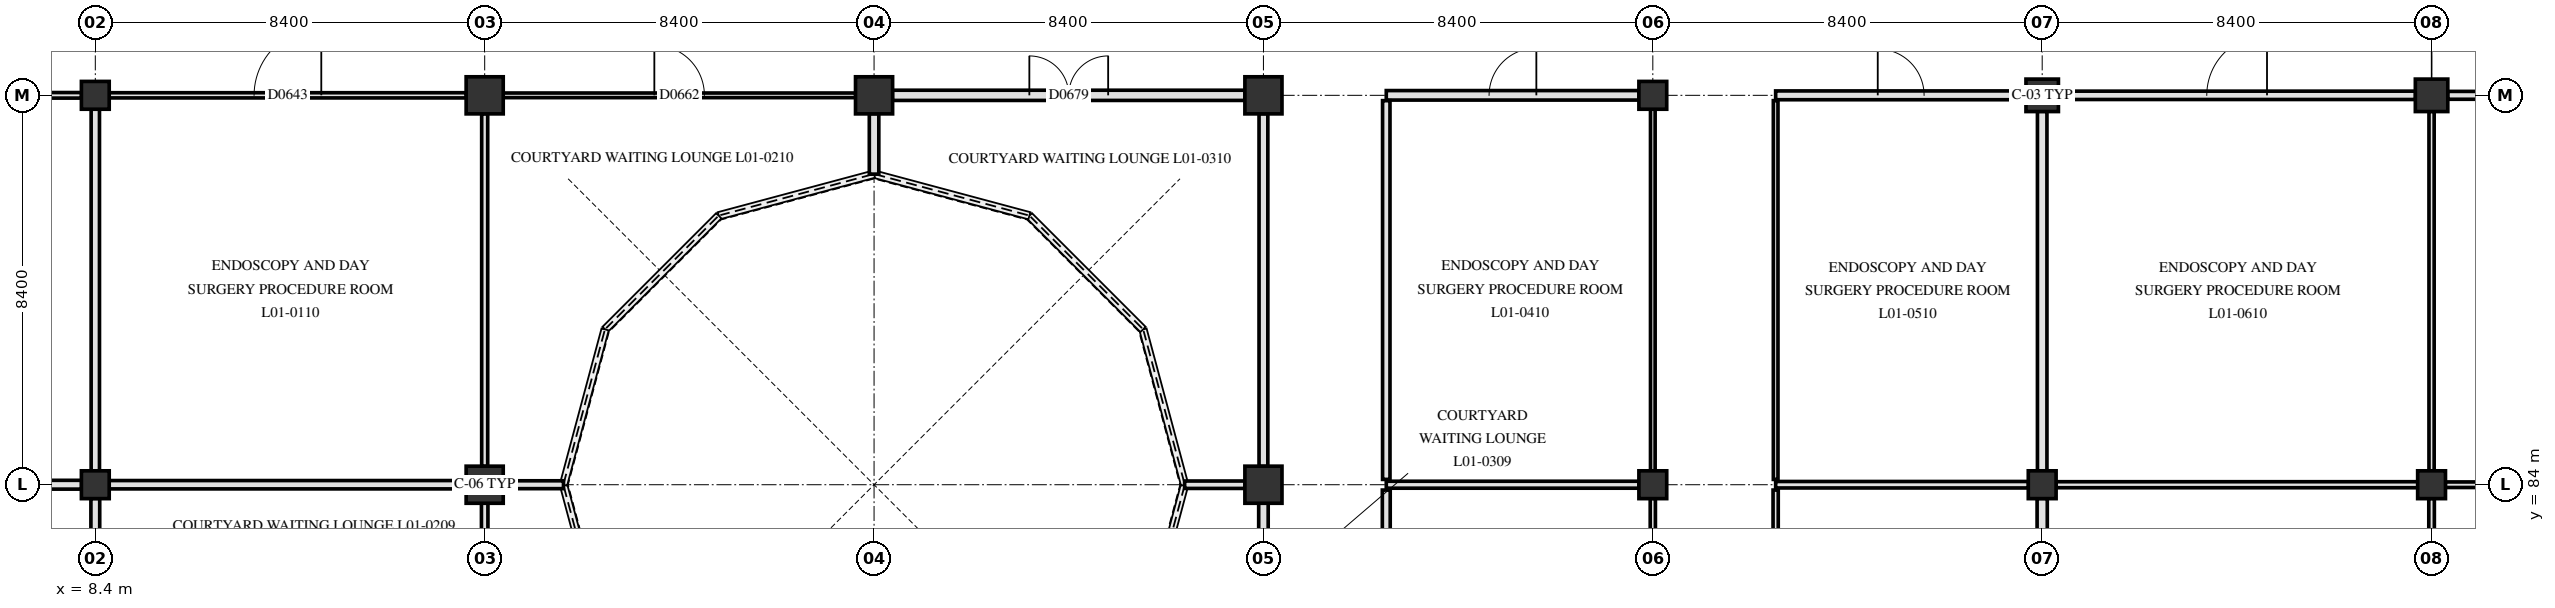
"""IFC4 building model, lengths in metres.
Left out: names, types, materials, properties, quantities, classifications, styles, units other than length and angle.
Written with IfcOpenShell. Run it as: python <this file> out.ifc"""

import sys

from ifc_helpers import new_model, si_unit, direction, frame, frame_2d, origin, origin_2d, place, context, subcontext, project, spatial, rectangle, circle, extrude, element, fill, save


model = new_model("IFC4")
c1 = context("Model", 3, precision=1e-05, world=origin(), true_north=direction((0.0, 1.0)))
c2 = subcontext(c1, "Body", "Model", "MODEL_VIEW")
j1 = project(units=[si_unit("LENGTHUNIT", "METRE"), si_unit("PLANEANGLEUNIT", "RADIAN")], contexts=[c1])
p1 = place(None, origin())
s1 = spatial("IfcSite", under=j1, at=p1, CompositionType="ELEMENT")
p2 = place(p1, origin())
s2 = spatial("IfcBuilding", under=s1, at=p2, CompositionType="ELEMENT")
p3 = place(p2, frame((0.0, 0.0, 4.8)))
s3 = spatial("IfcBuildingStorey", under=s2, at=p3, CompositionType="ELEMENT", Elevation=4.8)
for number, where, z_axis, x_axis in (
    (1, (8.4, 84.0, 0.0), (0.0, 0.0, 1.0), (1.0, 0.0, 0.0)),
    (2, (8.4, 92.4, 0.0), (0.0, 0.0, 1.0), (1.0, 0.0, 0.0)),
):
    element("IfcColumn", number, at=place(p3, frame(where, z_axis=z_axis, x_axis=x_axis)), inside=s3, PredefinedType="COLUMN", context=c2, shape_type="SweptSolid", body=[
        extrude(rectangle(XDim=0.6, YDim=0.6, at=origin_2d()), origin(), (0.0, 0.0, 1.0), 4.5),
    ])
for number, where, z_axis, x_axis in (
    (3, (16.8, 84.0, 0.0), (0.0, 0.0, 1.0), (1.0, 0.0, 0.0)),
    (4, (16.8, 92.4, 0.0), (0.0, 0.0, 1.0), (1.0, 0.0, 0.0)),
    (5, (25.2, 92.4, 0.0), (0.0, 0.0, 1.0), (1.0, 0.0, 0.0)),
    (6, (33.6, 84.0, 0.0), (0.0, 0.0, 1.0), (1.0, 0.0, 0.0)),
    (7, (33.6, 92.4, 0.0), (0.0, 0.0, 1.0), (1.0, 0.0, 0.0)),
):
    element("IfcColumn", number, at=place(p3, frame(where, z_axis=z_axis, x_axis=x_axis)), inside=s3, PredefinedType="COLUMN", context=c2, shape_type="SweptSolid", body=[
        extrude(circle(Radius=0.4, at=origin_2d()), origin(), (0.0, 0.0, 1.0), 4.5),
    ])
for number, where, z_axis, x_axis in (
    (8, (42.0, 84.0, 0.0), (0.0, 0.0, 1.0), (1.0, 0.0, 0.0)),
    (9, (42.0, 92.4, 0.0), (0.0, 0.0, 1.0), (1.0, 0.0, 0.0)),
    (10, (50.4, 84.0, 0.0), (0.0, 0.0, 1.0), (1.0, 0.0, 0.0)),
):
    element("IfcColumn", number, at=place(p3, frame(where, z_axis=z_axis, x_axis=x_axis)), inside=s3, PredefinedType="COLUMN", context=c2, shape_type="SweptSolid", body=[
        extrude(rectangle(XDim=0.6, YDim=0.6, at=origin_2d()), origin(), (0.0, 0.0, 1.0), 4.5),
    ])
p4 = place(p3, frame((50.4, 92.4, 0.0), z_axis=(0.0, 0.0, 1.0), x_axis=(1.0, 0.0, 0.0)))
e11 = element("IfcColumn", 11, at=p4, inside=s3, PredefinedType="COLUMN", context=c2, shape_type="SweptSolid", body=[
    extrude(rectangle(XDim=0.7, YDim=0.7, at=origin_2d()), origin(), (0.0, 0.0, 1.0), 4.5),
])
p5 = place(p3, frame((58.8, 84.0, 0.0), z_axis=(0.0, 0.0, 1.0), x_axis=(1.0, 0.0, 0.0)))
e12 = element("IfcColumn", 12, at=p5, inside=s3, PredefinedType="COLUMN", context=c2, shape_type="SweptSolid", body=[
    extrude(rectangle(XDim=0.6, YDim=0.6, at=origin_2d()), origin(), (0.0, 0.0, 1.0), 4.5),
])
p6 = place(p3, frame((58.8, 92.4, 0.0), z_axis=(0.0, 0.0, 1.0), x_axis=(1.0, 0.0, 0.0)))
e13 = element("IfcColumn", 13, at=p6, inside=s3, PredefinedType="COLUMN", context=c2, shape_type="SweptSolid", body=[
    extrude(rectangle(XDim=0.7, YDim=0.7, at=origin_2d()), origin(), (0.0, 0.0, 1.0), 4.5),
])
p7 = place(p3, frame((0.295, 84.0, 0.0), z_axis=(0.0, 0.0, 1.0), x_axis=(1.0, 0.0, 0.0)))
e14 = element("IfcWall", 14, at=p7, inside=s3, PredefinedType="PARTITIONING", context=c2, shape_type="SweptSolid", body=[
    extrude(rectangle(XDim=7.81, YDim=0.19, at=frame_2d((3.905, 0.0))), origin(), (0.0, 0.0, 1.0), 3.54),
])
p8 = place(p3, frame((8.695, 84.0, 0.0), z_axis=(0.0, 0.0, 1.0), x_axis=(1.0, 0.0, 0.0)))
e15 = element("IfcWall", 15, at=p8, inside=s3, PredefinedType="PARTITIONING", context=c2, shape_type="SweptSolid", body=[
    extrude(rectangle(XDim=7.71, YDim=0.18, at=frame_2d((3.855, 0.0))), origin(), (0.0, 0.0, 1.0), 3.54),
])
p9 = place(p3, frame((17.195, 84.0, 0.0), z_axis=(0.0, 0.0, 1.0), x_axis=(1.0, 0.0, 0.0)))
e16 = element("IfcWall", 16, at=p9, inside=s3, PredefinedType="PARTITIONING", context=c2, shape_type="SweptSolid", body=[
    extrude(rectangle(XDim=1.305, YDim=0.17, at=frame_2d((0.652, 0.0))), origin(), (0.0, 0.0, 1.0), 4.14),
])
p10 = place(p3, frame((31.9, 84.0, 0.0), z_axis=(0.0, 0.0, 1.0), x_axis=(1.0, 0.0, 0.0)))
e17 = element("IfcWall", 17, at=p10, inside=s3, PredefinedType="PARTITIONING", context=c2, shape_type="SweptSolid", body=[
    extrude(rectangle(XDim=1.305, YDim=0.16, at=frame_2d((0.653, 0.0))), origin(), (0.0, 0.0, 1.0), 4.14),
])
p11 = place(p3, frame((36.25, 84.0, 0.0), z_axis=(0.0, 0.0, 1.0), x_axis=(1.0, 0.0, 0.0)))
e18 = element("IfcWall", 18, at=p11, inside=s3, PredefinedType="PARTITIONING", context=c2, shape_type="SweptSolid", body=[
    extrude(rectangle(XDim=5.455, YDim=0.15, at=frame_2d((2.728, 0.0))), origin(), (0.0, 0.0, 1.0), 3.54),
])
p12 = place(p3, frame((44.65, 84.0, 0.0), z_axis=(0.0, 0.0, 1.0), x_axis=(1.0, 0.0, 0.0)))
e19 = element("IfcWall", 19, at=p12, inside=s3, PredefinedType="PARTITIONING", context=c2, shape_type="SweptSolid", body=[
    extrude(rectangle(XDim=5.455, YDim=0.14, at=frame_2d((2.728, 0.0))), origin(), (0.0, 0.0, 1.0), 3.54),
])
p13 = place(p3, frame((50.695, 84.0, 0.0), z_axis=(0.0, 0.0, 1.0), x_axis=(1.0, 0.0, 0.0)))
e20 = element("IfcWall", 20, at=p13, inside=s3, PredefinedType="PARTITIONING", context=c2, shape_type="SweptSolid", body=[
    extrude(rectangle(XDim=7.81, YDim=0.13, at=frame_2d((3.905, 0.0))), origin(), (0.0, 0.0, 1.0), 3.54),
])
p14 = place(p3, frame((59.095, 84.0, 0.0), z_axis=(0.0, 0.0, 1.0), x_axis=(1.0, 0.0, 0.0)))
e21 = element("IfcWall", 21, at=p14, inside=s3, PredefinedType="PARTITIONING", context=c2, shape_type="SweptSolid", body=[
    extrude(rectangle(XDim=7.81, YDim=0.12, at=frame_2d((3.905, 0.0))), origin(), (0.0, 0.0, 1.0), 3.54),
])
p15 = place(p3, frame((0.295, 92.4, 0.0), z_axis=(0.0, 0.0, 1.0), x_axis=(1.0, 0.0, 0.0)))
e22 = element("IfcWall", 22, at=p15, inside=s3, PredefinedType="PARTITIONING", context=c2, shape_type="SweptSolid", body=[
    extrude(rectangle(XDim=7.81, YDim=0.12, at=frame_2d((3.905, 0.0))), origin(), (0.0, 0.0, 1.0), 3.54),
])
p16 = place(p15, frame((3.28, 0.0, 0.0)))
e23 = element("IfcOpeningElement", 23, at=p16, cuts=e22, PredefinedType="OPENING", context=c2, shape_type="SweptSolid", body=[
    extrude(rectangle(XDim=1.25, YDim=2.2, at=frame_2d((0.625, 1.1))), frame((0.0, 0.07, 0.0), z_axis=(0.0, -1.0, 0.0), x_axis=(1.0, 0.0, 0.0)), (0.0, 0.0, 1.0), 0.14),
])
p17 = place(p3, frame((8.695, 92.4, 0.0), z_axis=(0.0, 0.0, 1.0), x_axis=(1.0, 0.0, 0.0)))
e24 = element("IfcWall", 24, at=p17, inside=s3, PredefinedType="PARTITIONING", context=c2, shape_type="SweptSolid", body=[
    extrude(rectangle(XDim=7.71, YDim=0.112, at=frame_2d((3.855, 0.0))), origin(), (0.0, 0.0, 1.0), 3.54),
])
p18 = place(p17, frame((3.13, 0.0, 0.0)))
e25 = element("IfcOpeningElement", 25, at=p18, cuts=e24, PredefinedType="OPENING", context=c2, shape_type="SweptSolid", body=[
    extrude(rectangle(XDim=1.45, YDim=2.2, at=frame_2d((0.725, 1.1))), frame((0.0, 0.066, 0.0), z_axis=(0.0, -1.0, 0.0), x_axis=(1.0, 0.0, 0.0)), (0.0, 0.0, 1.0), 0.132),
])
p19 = place(p3, frame((17.195, 92.4, 0.0), z_axis=(0.0, 0.0, 1.0), x_axis=(1.0, 0.0, 0.0)))
e26 = element("IfcWall", 26, at=p19, inside=s3, PredefinedType="PARTITIONING", context=c2, shape_type="SweptSolid", body=[
    extrude(rectangle(XDim=7.61, YDim=0.1, at=frame_2d((3.805, 0.0))), origin(), (0.0, 0.0, 1.0), 3.54),
])
p20 = place(p19, frame((3.265, 0.0, 0.0)))
e27 = element("IfcOpeningElement", 27, at=p20, cuts=e26, PredefinedType="OPENING", context=c2, shape_type="SweptSolid", body=[
    extrude(rectangle(XDim=1.08, YDim=2.12, at=frame_2d((0.54, 1.06))), frame((0.0, 0.06, 0.0), z_axis=(0.0, -1.0, 0.0), x_axis=(1.0, 0.0, 0.0)), (0.0, 0.0, 1.0), 0.12),
])
p21 = place(p3, frame((25.595, 92.4, 0.0), z_axis=(0.0, 0.0, 1.0), x_axis=(1.0, 0.0, 0.0)))
e28 = element("IfcWall", 28, at=p21, inside=s3, PredefinedType="PARTITIONING", context=c2, shape_type="SweptSolid", body=[
    extrude(rectangle(XDim=7.61, YDim=0.22, at=frame_2d((3.805, 0.0))), origin(), (0.0, 0.0, 1.0), 3.54),
])
p22 = place(p21, frame((2.955, 0.0, 0.0)))
e29 = element("IfcOpeningElement", 29, at=p22, cuts=e28, PredefinedType="OPENING", context=c2, shape_type="SweptSolid", body=[
    extrude(rectangle(XDim=1.7, YDim=2.25, at=frame_2d((0.85, 1.125))), frame((0.0, 0.12, 0.0), z_axis=(0.0, -1.0, 0.0), x_axis=(1.0, 0.0, 0.0)), (0.0, 0.0, 1.0), 0.24),
])
p23 = place(p3, frame((36.25, 92.4, 0.0), z_axis=(0.0, 0.0, 1.0), x_axis=(1.0, 0.0, 0.0)))
e30 = element("IfcWall", 30, at=p23, inside=s3, PredefinedType="PARTITIONING", context=c2, shape_type="SweptSolid", body=[
    extrude(rectangle(XDim=5.455, YDim=0.205, at=frame_2d((2.728, 0.0))), origin(), (0.0, 0.0, 1.0), 3.54),
])
p24 = place(p23, frame((2.218, 0.0, 0.0)))
e31 = element("IfcOpeningElement", 31, at=p24, cuts=e30, PredefinedType="OPENING", context=c2, shape_type="SweptSolid", body=[
    extrude(rectangle(XDim=1.02, YDim=2.12, at=frame_2d((0.51, 1.06))), frame((0.0, 0.113, 0.0), z_axis=(0.0, -1.0, 0.0), x_axis=(1.0, 0.0, 0.0)), (0.0, 0.0, 1.0), 0.225),
])
p25 = place(p3, frame((44.65, 92.4, 0.0), z_axis=(0.0, 0.0, 1.0), x_axis=(1.0, 0.0, 0.0)))
e32 = element("IfcWall", 32, at=p25, inside=s3, PredefinedType="PARTITIONING", context=c2, shape_type="SweptSolid", body=[
    extrude(rectangle(XDim=5.405, YDim=0.19, at=frame_2d((2.703, 0.0))), origin(), (0.0, 0.0, 1.0), 3.54),
])
p26 = place(p25, frame((2.202, 0.0, 0.0)))
e33 = element("IfcOpeningElement", 33, at=p26, cuts=e32, PredefinedType="OPENING", context=c2, shape_type="SweptSolid", body=[
    extrude(rectangle(XDim=1.0, YDim=2.15, at=frame_2d((0.5, 1.075))), frame((0.0, 0.105, 0.0), z_axis=(0.0, -1.0, 0.0), x_axis=(1.0, 0.0, 0.0)), (0.0, 0.0, 1.0), 0.21),
])
p27 = place(p3, frame((50.745, 92.4, 0.0), z_axis=(0.0, 0.0, 1.0), x_axis=(1.0, 0.0, 0.0)))
e34 = element("IfcWall", 34, at=p27, inside=s3, PredefinedType="PARTITIONING", context=c2, shape_type="SweptSolid", body=[
    extrude(rectangle(XDim=7.71, YDim=0.18, at=frame_2d((3.855, 0.0))), origin(), (0.0, 0.0, 1.0), 3.54),
])
p28 = place(p27, frame((3.205, 0.0, 0.0)))
e35 = element("IfcOpeningElement", 35, at=p28, cuts=e34, PredefinedType="OPENING", context=c2, shape_type="SweptSolid", body=[
    extrude(rectangle(XDim=1.3, YDim=2.2, at=frame_2d((0.65, 1.1))), frame((0.0, 0.1, 0.0), z_axis=(0.0, -1.0, 0.0), x_axis=(1.0, 0.0, 0.0)), (0.0, 0.0, 1.0), 0.2),
])
p29 = place(p3, frame((59.145, 92.4, 0.0), z_axis=(0.0, 0.0, 1.0), x_axis=(1.0, 0.0, 0.0)))
e36 = element("IfcWall", 36, at=p29, inside=s3, PredefinedType="PARTITIONING", context=c2, shape_type="SweptSolid", body=[
    extrude(rectangle(XDim=7.66, YDim=0.17, at=frame_2d((3.83, 0.0))), origin(), (0.0, 0.0, 1.0), 3.54),
])
p30 = place(p29, frame((2.91, 0.0, 0.0)))
e37 = element("IfcOpeningElement", 37, at=p30, cuts=e36, PredefinedType="OPENING", context=c2, shape_type="SweptSolid", body=[
    extrude(rectangle(XDim=1.84, YDim=2.28, at=frame_2d((0.92, 1.14))), frame((0.0, 0.095, 0.0), z_axis=(0.0, -1.0, 0.0), x_axis=(1.0, 0.0, 0.0)), (0.0, 0.0, 1.0), 0.19),
])
p31 = place(p3, frame((8.4, 78.315, 0.0), z_axis=(0.0, 0.0, 1.0), x_axis=(0.0, 1.0, 0.0)))
e38 = element("IfcWall", 38, at=p31, inside=s3, PredefinedType="PARTITIONING", context=c2, shape_type="SweptSolid", body=[
    extrude(rectangle(XDim=5.39, YDim=0.19, at=frame_2d((2.695, 0.0))), origin(), (0.0, 0.0, 1.0), 3.59),
])
p32 = place(p3, frame((8.4, 84.295, 0.0), z_axis=(0.0, 0.0, 1.0), x_axis=(0.0, 1.0, 0.0)))
e39 = element("IfcWall", 39, at=p32, inside=s3, PredefinedType="PARTITIONING", context=c2, shape_type="SweptSolid", body=[
    extrude(rectangle(XDim=7.81, YDim=0.18, at=frame_2d((3.905, 0.0))), origin(), (0.0, 0.0, 1.0), 3.59),
])
p33 = place(p3, frame((16.8, 78.315, 0.0), z_axis=(0.0, 0.0, 1.0), x_axis=(0.0, 1.0, 0.0)))
e40 = element("IfcWall", 40, at=p33, inside=s3, PredefinedType="PARTITIONING", context=c2, shape_type="SweptSolid", body=[
    extrude(rectangle(XDim=5.29, YDim=0.14, at=frame_2d((2.645, 0.0))), origin(), (0.0, 0.0, 1.0), 3.59),
])
p34 = place(p3, frame((16.8, 84.395, 0.0), z_axis=(0.0, 0.0, 1.0), x_axis=(0.0, 1.0, 0.0)))
e41 = element("IfcWall", 41, at=p34, inside=s3, PredefinedType="PARTITIONING", context=c2, shape_type="SweptSolid", body=[
    extrude(rectangle(XDim=7.61, YDim=0.13, at=frame_2d((3.805, 0.0))), origin(), (0.0, 0.0, 1.0), 3.59),
])
p35 = place(p3, frame((25.2, 90.7, 0.0), z_axis=(0.0, 0.0, 1.0), x_axis=(0.0, 1.0, 0.0)))
e42 = element("IfcWall", 42, at=p35, inside=s3, PredefinedType="PARTITIONING", context=c2, shape_type="SweptSolid", body=[
    extrude(rectangle(XDim=1.305, YDim=0.205, at=frame_2d((0.652, 0.0))), origin(), (0.0, 0.0, 1.0), 4.14),
])
p36 = place(p3, frame((33.6, 78.315, 0.0), z_axis=(0.0, 0.0, 1.0), x_axis=(0.0, 1.0, 0.0)))
e43 = element("IfcWall", 43, at=p36, inside=s3, PredefinedType="PARTITIONING", context=c2, shape_type="SweptSolid", body=[
    extrude(rectangle(XDim=5.29, YDim=0.205, at=frame_2d((2.645, 0.0))), origin(), (0.0, 0.0, 1.0), 3.59),
])
p37 = place(p3, frame((33.6, 84.395, 0.0), z_axis=(0.0, 0.0, 1.0), x_axis=(0.0, 1.0, 0.0)))
e44 = element("IfcWall", 44, at=p37, inside=s3, PredefinedType="PARTITIONING", context=c2, shape_type="SweptSolid", body=[
    extrude(rectangle(XDim=7.61, YDim=0.19, at=frame_2d((3.805, 0.0))), origin(), (0.0, 0.0, 1.0), 3.59),
])
p38 = place(p3, frame((36.25, 78.315, 0.0), z_axis=(0.0, 0.0, 1.0), x_axis=(0.0, 1.0, 0.0)))
e45 = element("IfcWall", 45, at=p38, inside=s3, PredefinedType="PARTITIONING", context=c2, shape_type="SweptSolid", body=[
    extrude(rectangle(XDim=5.57, YDim=0.17, at=frame_2d((2.785, 0.0))), origin(), (0.0, 0.0, 1.0), 3.54),
])
p39 = place(p3, frame((36.25, 84.115, 0.0), z_axis=(0.0, 0.0, 1.0), x_axis=(0.0, 1.0, 0.0)))
e46 = element("IfcWall", 46, at=p39, inside=s3, PredefinedType="PARTITIONING", context=c2, shape_type="SweptSolid", body=[
    extrude(rectangle(XDim=8.17, YDim=0.16, at=frame_2d((4.085, 0.0))), origin(), (0.0, 0.0, 1.0), 3.54),
])
p40 = place(p3, frame((42.0, 78.315, 0.0), z_axis=(0.0, 0.0, 1.0), x_axis=(0.0, 1.0, 0.0)))
e47 = element("IfcWall", 47, at=p40, inside=s3, PredefinedType="PARTITIONING", context=c2, shape_type="SweptSolid", body=[
    extrude(rectangle(XDim=5.39, YDim=0.112, at=frame_2d((2.695, 0.0))), origin(), (0.0, 0.0, 1.0), 3.59),
])
p41 = place(p3, frame((42.0, 84.295, 0.0), z_axis=(0.0, 0.0, 1.0), x_axis=(0.0, 1.0, 0.0)))
e48 = element("IfcWall", 48, at=p41, inside=s3, PredefinedType="PARTITIONING", context=c2, shape_type="SweptSolid", body=[
    extrude(rectangle(XDim=7.81, YDim=0.1, at=frame_2d((3.905, 0.0))), origin(), (0.0, 0.0, 1.0), 3.59),
])
p42 = place(p3, frame((44.65, 78.315, 0.0), z_axis=(0.0, 0.0, 1.0), x_axis=(0.0, 1.0, 0.0)))
e49 = element("IfcWall", 49, at=p42, inside=s3, PredefinedType="PARTITIONING", context=c2, shape_type="SweptSolid", body=[
    extrude(rectangle(XDim=5.57, YDim=0.112, at=frame_2d((2.785, 0.0))), origin(), (0.0, 0.0, 1.0), 3.54),
])
p43 = place(p3, frame((44.65, 84.115, 0.0), z_axis=(0.0, 0.0, 1.0), x_axis=(0.0, 1.0, 0.0)))
e50 = element("IfcWall", 50, at=p43, inside=s3, PredefinedType="PARTITIONING", context=c2, shape_type="SweptSolid", body=[
    extrude(rectangle(XDim=8.17, YDim=0.1, at=frame_2d((4.085, 0.0))), origin(), (0.0, 0.0, 1.0), 3.54),
])
p44 = place(p3, frame((50.4, 78.315, 0.0), z_axis=(0.0, 0.0, 1.0), x_axis=(0.0, 1.0, 0.0)))
e51 = element("IfcWall", 51, at=p44, inside=s3, PredefinedType="PARTITIONING", context=c2, shape_type="SweptSolid", body=[
    extrude(rectangle(XDim=5.39, YDim=0.22, at=frame_2d((2.695, 0.0))), origin(), (0.0, 0.0, 1.0), 3.59),
])
p45 = place(p3, frame((50.4, 84.295, 0.0), z_axis=(0.0, 0.0, 1.0), x_axis=(0.0, 1.0, 0.0)))
e52 = element("IfcWall", 52, at=p45, inside=s3, PredefinedType="PARTITIONING", context=c2, shape_type="SweptSolid", body=[
    extrude(rectangle(XDim=7.76, YDim=0.205, at=frame_2d((3.88, 0.0))), origin(), (0.0, 0.0, 1.0), 3.59),
])
p46 = place(p3, frame((58.8, 78.315, 0.0), z_axis=(0.0, 0.0, 1.0), x_axis=(0.0, 1.0, 0.0)))
e53 = element("IfcWall", 53, at=p46, inside=s3, PredefinedType="PARTITIONING", context=c2, shape_type="SweptSolid", body=[
    extrude(rectangle(XDim=5.39, YDim=0.12, at=frame_2d((2.695, 0.0))), origin(), (0.0, 0.0, 1.0), 3.59),
])
p47 = place(p3, frame((58.8, 84.295, 0.0), z_axis=(0.0, 0.0, 1.0), x_axis=(0.0, 1.0, 0.0)))
e54 = element("IfcWall", 54, at=p47, inside=s3, PredefinedType="PARTITIONING", context=c2, shape_type="SweptSolid", body=[
    extrude(rectangle(XDim=7.76, YDim=0.112, at=frame_2d((3.88, 0.0))), origin(), (0.0, 0.0, 1.0), 3.59),
])
p48 = place(p18, origin())
e55 = element("IfcDoor", 55, at=p48, inside=s3, OperationType="SINGLE_SWING_RIGHT", PredefinedType="DOOR", context=c2, shape_type="SweptSolid", body=[
    extrude(rectangle(XDim=1.45, YDim=2.2, at=frame_2d((0.725, 1.1))), frame((0.0, 0.025, 0.0), z_axis=(0.0, -1.0, 0.0), x_axis=(1.0, 0.0, 0.0)), (0.0, 0.0, 1.0), 0.05),
])
fill(e25, e55)
p49 = place(p20, origin())
e56 = element("IfcDoor", 56, at=p49, inside=s3, OperationType="SINGLE_SWING_LEFT", PredefinedType="DOOR", context=c2, shape_type="SweptSolid", body=[
    extrude(rectangle(XDim=1.08, YDim=2.12, at=frame_2d((0.54, 1.06))), frame((0.0, 0.025, 0.0), z_axis=(0.0, -1.0, 0.0), x_axis=(1.0, 0.0, 0.0)), (0.0, 0.0, 1.0), 0.05),
])
fill(e27, e56)
p50 = place(p22, origin())
e57 = element("IfcDoor", 57, at=p50, inside=s3, OperationType="DOUBLE_SWING_RIGHT", PredefinedType="DOOR", context=c2, shape_type="SweptSolid", body=[
    extrude(rectangle(XDim=1.7, YDim=2.25, at=frame_2d((0.85, 1.125))), frame((0.0, 0.025, 0.0), z_axis=(0.0, -1.0, 0.0), x_axis=(1.0, 0.0, 0.0)), (0.0, 0.0, 1.0), 0.05),
])
fill(e29, e57)
p51 = place(p24, origin())
e58 = element("IfcDoor", 58, at=p51, inside=s3, OperationType="SINGLE_SWING_RIGHT", PredefinedType="DOOR", context=c2, shape_type="SweptSolid", body=[
    extrude(rectangle(XDim=1.02, YDim=2.12, at=frame_2d((0.51, 1.06))), frame((0.0, 0.025, 0.0), z_axis=(0.0, -1.0, 0.0), x_axis=(1.0, 0.0, 0.0)), (0.0, 0.0, 1.0), 0.05),
])
fill(e31, e58)
p52 = place(p26, origin())
e59 = element("IfcDoor", 59, at=p52, inside=s3, OperationType="SINGLE_SWING_LEFT", PredefinedType="DOOR", context=c2, shape_type="SweptSolid", body=[
    extrude(rectangle(XDim=1.0, YDim=2.15, at=frame_2d((0.5, 1.075))), frame((0.0, 0.025, 0.0), z_axis=(0.0, -1.0, 0.0), x_axis=(1.0, 0.0, 0.0)), (0.0, 0.0, 1.0), 0.05),
])
fill(e33, e59)
p53 = place(p28, origin())
e60 = element("IfcDoor", 60, at=p53, inside=s3, OperationType="SINGLE_SWING_RIGHT", PredefinedType="DOOR", context=c2, shape_type="SweptSolid", body=[
    extrude(rectangle(XDim=1.3, YDim=2.2, at=frame_2d((0.65, 1.1))), frame((0.0, 0.025, 0.0), z_axis=(0.0, -1.0, 0.0), x_axis=(1.0, 0.0, 0.0)), (0.0, 0.0, 1.0), 0.05),
])
fill(e35, e60)
save(model, sys.argv[1])
